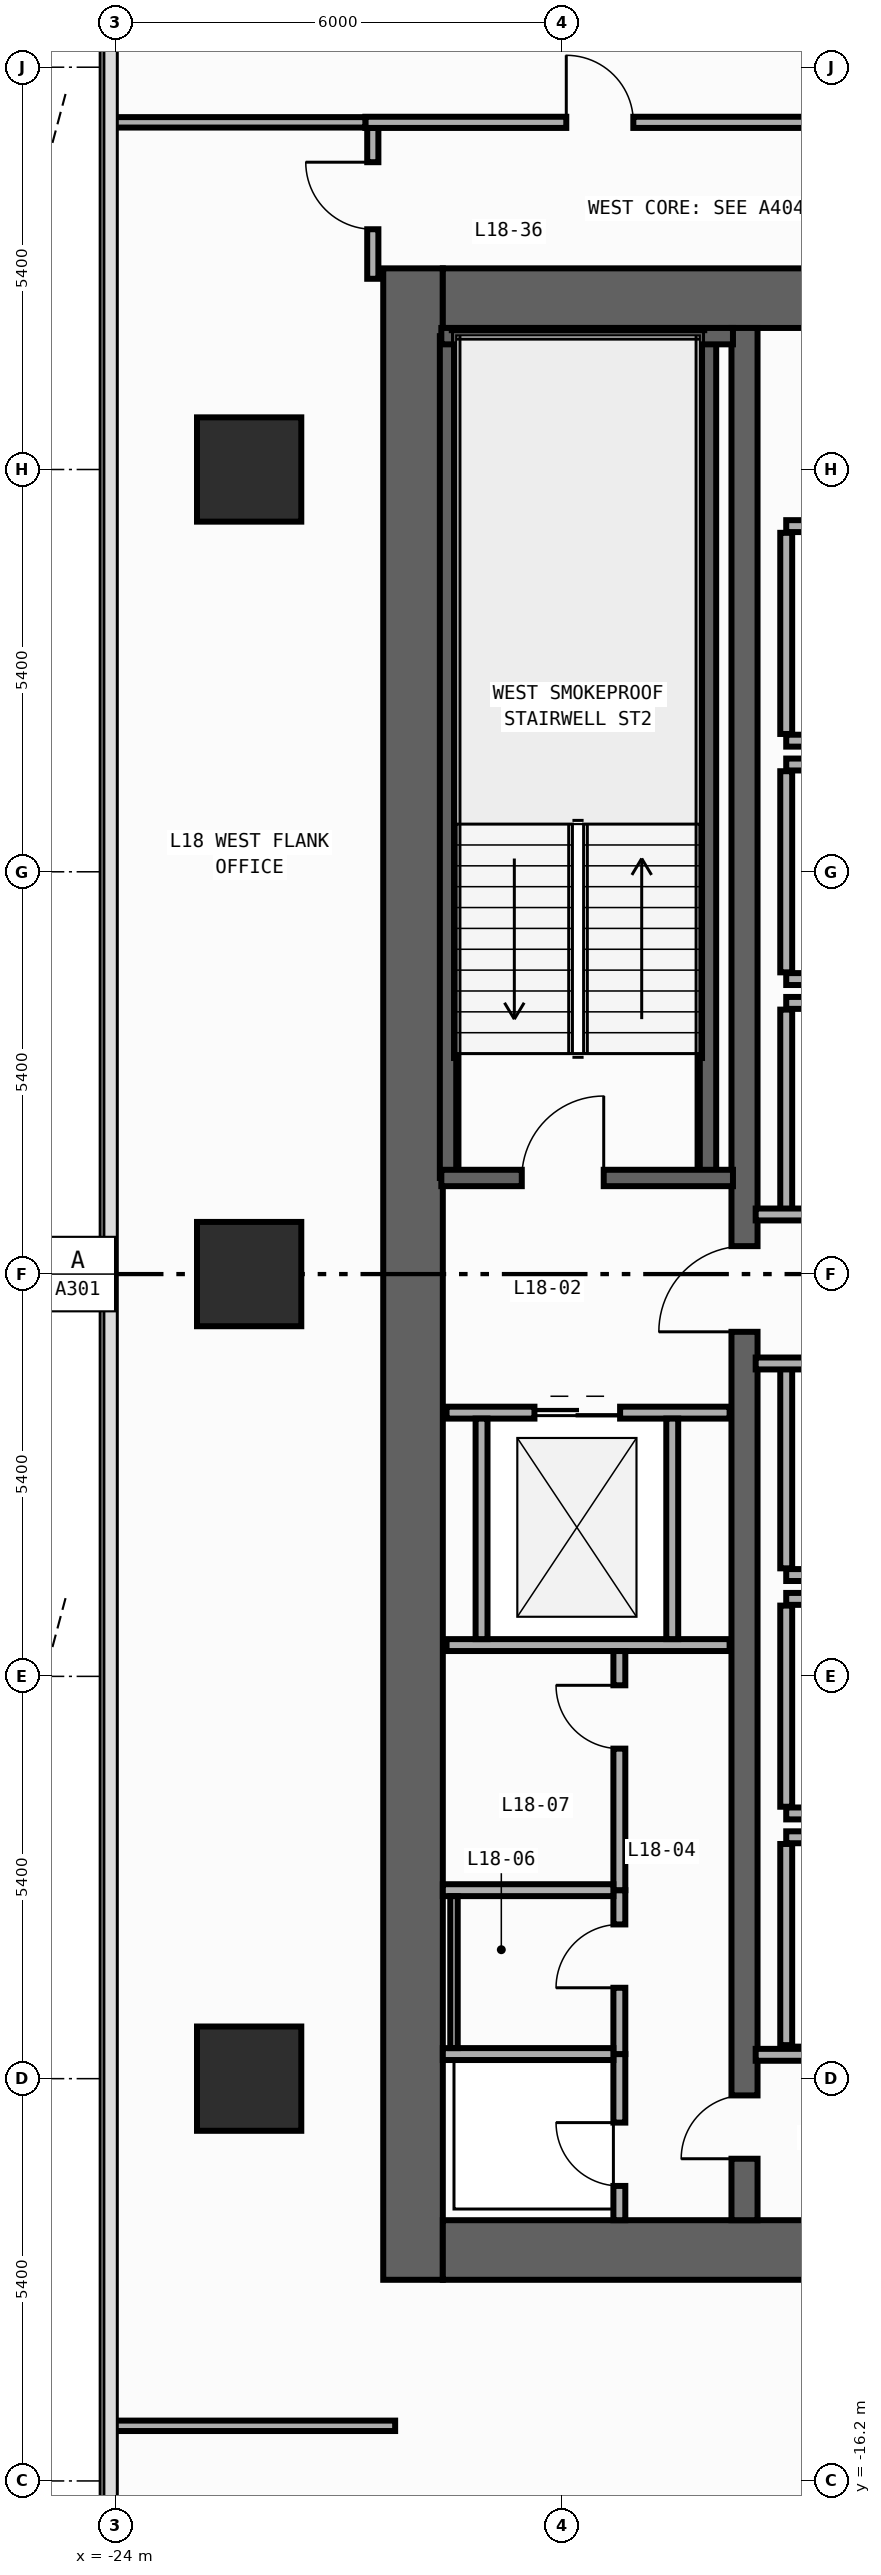
"""IFC4 building model, lengths in metres.
Left out: names, types, materials, properties, quantities, classifications, styles, units other than length and angle.
Written with IfcOpenShell. Run it as: python <this file> out.ifc"""

import sys

from ifc_helpers import new_model, si_unit, direction, frame, frame_2d, origin, origin_2d, place, context, subcontext, project, spatial, rectangle, extrude, element, fill, save


model = new_model("IFC4")
c1 = context("Model", 3, precision=1e-05, world=origin(), true_north=direction((0.0, 1.0)))
c2 = subcontext(c1, "Body", "Model", "MODEL_VIEW")
j1 = project(units=[si_unit("LENGTHUNIT", "METRE"), si_unit("PLANEANGLEUNIT", "RADIAN")], contexts=[c1])
p1 = place(None, origin())
s1 = spatial("IfcSite", under=j1, at=p1, CompositionType="ELEMENT")
p2 = place(p1, origin())
s2 = spatial("IfcBuilding", under=s1, at=p2, CompositionType="ELEMENT")
p3 = place(p2, frame((0.0, 0.0, 76.4)))
s3 = spatial("IfcBuildingStorey", under=s2, at=p3, CompositionType="ELEMENT", Elevation=76.4)
p4 = place(p3, frame((-20.0, -13.5, 0.0), z_axis=(0.0, 0.0, 1.0), x_axis=(0.0, 1.0, 0.0)))
e1 = element("IfcWall", 1, at=p4, inside=s3, PredefinedType="SHEAR", context=c2, shape_type="SweptSolid", body=[
    extrude(rectangle(XDim=27.0, YDim=0.8, at=frame_2d((13.5, 0.0))), origin(), (0.0, 0.0, 1.0), 3.94),
])
for number, where, z_axis, x_axis in (
    (2, (-19.6, -13.1, 0.0), (0.0, 0.0, 1.0), (1.0, 0.0, 0.0)),
    (3, (-19.6, 13.1, 0.0), (0.0, 0.0, 1.0), (1.0, 0.0, 0.0)),
):
    element("IfcWall", number, at=place(p3, frame(where, z_axis=z_axis, x_axis=x_axis)), inside=s3, PredefinedType="SHEAR", context=c2, shape_type="SweptSolid", body=[
        extrude(rectangle(XDim=6.8, YDim=0.8, at=frame_2d((3.4, 0.0))), origin(), (0.0, 0.0, 1.0), 3.94),
    ])
p5 = place(p3, frame((-15.55, -12.7, 0.0), z_axis=(0.0, 0.0, 1.0), x_axis=(0.0, 1.0, 0.0)))
e4 = element("IfcWall", 4, at=p5, inside=s3, PredefinedType="SHEAR", context=c2, shape_type="SweptSolid", body=[
    extrude(rectangle(XDim=25.4, YDim=0.35, at=frame_2d((12.7, 0.0))), origin(), (0.0, 0.0, 1.0), 3.94),
])
p6 = place(p5, frame((11.925, 0.0, 0.0)))
e5 = element("IfcOpeningElement", 5, at=p6, cuts=e4, PredefinedType="OPENING", context=c2, shape_type="SweptSolid", body=[
    extrude(rectangle(XDim=1.15, YDim=2.2, at=frame_2d((0.575, 1.1))), frame((0.0, 0.185, 0.0), z_axis=(0.0, -1.0, 0.0), x_axis=(1.0, 0.0, 0.0)), (0.0, 0.0, 1.0), 0.37),
])
p7 = place(p5, frame((0.825, 0.0, 0.0)))
e6 = element("IfcOpeningElement", 6, at=p7, cuts=e4, PredefinedType="OPENING", context=c2, shape_type="SweptSolid", body=[
    extrude(rectangle(XDim=0.85, YDim=2.1, at=frame_2d((0.425, 1.05))), frame((0.0, 0.185, 0.0), z_axis=(0.0, -1.0, 0.0), x_axis=(1.0, 0.0, 0.0)), (0.0, 0.0, 1.0), 0.37),
])
for number, where, z_axis, x_axis in (
    (7, (-16.04, 1.29, 0.0), (0.0, 0.0, 1.0), (0.0, 1.0, 0.0)),
    (8, (-19.53, 1.29, 0.0), (0.0, 0.0, 1.0), (0.0, 1.0, 0.0)),
):
    element("IfcWall", number, at=place(p3, frame(where, z_axis=z_axis, x_axis=x_axis)), inside=s3, PredefinedType="SHEAR", context=c2, shape_type="SweptSolid", body=[
        extrude(rectangle(XDim=11.3, YDim=0.22, at=frame_2d((5.65, 0.0))), origin(), (0.0, 0.0, 1.0), 3.94),
    ])
p8 = place(p3, frame((-19.62, 12.59, 0.0), z_axis=(0.0, 0.0, 1.0), x_axis=(1.0, 0.0, 0.0)))
e9 = element("IfcWall", 9, at=p8, inside=s3, PredefinedType="SHEAR", context=c2, shape_type="SweptSolid", body=[
    extrude(rectangle(XDim=3.915, YDim=0.22, at=frame_2d((1.958, 0.0))), origin(), (0.0, 0.0, 1.0), 3.94),
])
p9 = place(p3, frame((-19.62, 1.29, 0.0), z_axis=(0.0, 0.0, 1.0), x_axis=(1.0, 0.0, 0.0)))
e10 = element("IfcWall", 10, at=p9, inside=s3, PredefinedType="SHEAR", context=c2, shape_type="SweptSolid", body=[
    extrude(rectangle(XDim=3.915, YDim=0.22, at=frame_2d((1.958, 0.0))), origin(), (0.0, 0.0, 1.0), 3.94),
])
p10 = place(p9, frame((1.08, 0.0, 0.0)))
e11 = element("IfcOpeningElement", 11, at=p10, cuts=e10, PredefinedType="OPENING", context=c2, shape_type="SweptSolid", body=[
    extrude(rectangle(XDim=1.1, YDim=2.2, at=frame_2d((0.55, 1.1))), frame((0.0, 0.12, 0.0), z_axis=(0.0, -1.0, 0.0), x_axis=(1.0, 0.0, 0.0)), (0.0, 0.0, 1.0), 0.24),
])
for number, where, z_axis, x_axis in (
    (12, (-22.2, -10.8, 0.0), (0.0, 0.0, 1.0), (1.0, 0.0, 0.0)),
    (13, (-22.2, 0.0, 0.0), (0.0, 0.0, 1.0), (1.0, 0.0, 0.0)),
    (14, (-22.2, 10.8, 0.0), (0.0, 0.0, 1.0), (1.0, 0.0, 0.0)),
):
    element("IfcColumn", number, at=place(p3, frame(where, z_axis=z_axis, x_axis=x_axis)), inside=s3, PredefinedType="COLUMN", context=c2, shape_type="SweptSolid", body=[
        extrude(rectangle(XDim=1.4, YDim=1.4, at=origin_2d()), origin(), (0.0, 0.0, 1.0), 4.2),
    ])
for number, where, z_axis, x_axis in (
    (15, (-14.99, 7.16, 0.0), (0.0, 0.0, 1.0), (1.0, 0.0, 0.0)),
    (16, (-14.99, 10.04, 0.0), (0.0, 0.0, 1.0), (1.0, 0.0, 0.0)),
):
    element("IfcWall", number, at=place(p3, frame(where, z_axis=z_axis, x_axis=x_axis)), inside=s3, PredefinedType="STANDARD", context=c2, shape_type="SweptSolid", body=[
        extrude(rectangle(XDim=2.19, YDim=0.16, at=frame_2d((1.095, 0.0))), origin(), (0.0, 0.0, 1.0), 3.94),
    ])
p11 = place(p3, frame((-14.99, 7.25, 0.0), z_axis=(0.0, 0.0, 1.0), x_axis=(0.0, 1.0, 0.0)))
e17 = element("IfcWall", 17, at=p11, inside=s3, PredefinedType="STANDARD", context=c2, shape_type="SweptSolid", body=[
    extrude(rectangle(XDim=2.7, YDim=0.16, at=frame_2d((1.35, 0.0))), origin(), (0.0, 0.0, 1.0), 3.94),
])
for number, where, z_axis, x_axis in (
    (18, (-14.99, 3.96, 0.0), (0.0, 0.0, 1.0), (1.0, 0.0, 0.0)),
    (19, (-14.99, 6.84, 0.0), (0.0, 0.0, 1.0), (1.0, 0.0, 0.0)),
):
    element("IfcWall", number, at=place(p3, frame(where, z_axis=z_axis, x_axis=x_axis)), inside=s3, PredefinedType="STANDARD", context=c2, shape_type="SweptSolid", body=[
        extrude(rectangle(XDim=2.19, YDim=0.16, at=frame_2d((1.095, 0.0))), origin(), (0.0, 0.0, 1.0), 3.94),
    ])
p12 = place(p3, frame((-14.99, 4.05, 0.0), z_axis=(0.0, 0.0, 1.0), x_axis=(0.0, 1.0, 0.0)))
e20 = element("IfcWall", 20, at=p12, inside=s3, PredefinedType="STANDARD", context=c2, shape_type="SweptSolid", body=[
    extrude(rectangle(XDim=2.7, YDim=0.16, at=frame_2d((1.35, 0.0))), origin(), (0.0, 0.0, 1.0), 3.94),
])
p13 = place(p3, frame((-14.99, 3.64, 0.0), z_axis=(0.0, 0.0, 1.0), x_axis=(1.0, 0.0, 0.0)))
e21 = element("IfcWall", 21, at=p13, inside=s3, PredefinedType="STANDARD", context=c2, shape_type="SweptSolid", body=[
    extrude(rectangle(XDim=2.19, YDim=0.16, at=frame_2d((1.095, 0.0))), origin(), (0.0, 0.0, 1.0), 3.94),
])
p14 = place(p3, frame((-14.99, 0.85, 0.0), z_axis=(0.0, 0.0, 1.0), x_axis=(0.0, 1.0, 0.0)))
e22 = element("IfcWall", 22, at=p14, inside=s3, PredefinedType="STANDARD", context=c2, shape_type="SweptSolid", body=[
    extrude(rectangle(XDim=2.7, YDim=0.16, at=frame_2d((1.35, 0.0))), origin(), (0.0, 0.0, 1.0), 3.94),
])
p15 = place(p3, frame((-14.99, -4.04, 0.0), z_axis=(0.0, 0.0, 1.0), x_axis=(1.0, 0.0, 0.0)))
e23 = element("IfcWall", 23, at=p15, inside=s3, PredefinedType="STANDARD", context=c2, shape_type="SweptSolid", body=[
    extrude(rectangle(XDim=2.19, YDim=0.16, at=frame_2d((1.095, 0.0))), origin(), (0.0, 0.0, 1.0), 3.94),
])
p16 = place(p3, frame((-14.99, -3.95, 0.0), z_axis=(0.0, 0.0, 1.0), x_axis=(0.0, 1.0, 0.0)))
e24 = element("IfcWall", 24, at=p16, inside=s3, PredefinedType="STANDARD", context=c2, shape_type="SweptSolid", body=[
    extrude(rectangle(XDim=2.7, YDim=0.16, at=frame_2d((1.35, 0.0))), origin(), (0.0, 0.0, 1.0), 3.94),
])
for number, where, z_axis, x_axis in (
    (25, (-14.99, -7.24, 0.0), (0.0, 0.0, 1.0), (1.0, 0.0, 0.0)),
    (26, (-14.99, -4.36, 0.0), (0.0, 0.0, 1.0), (1.0, 0.0, 0.0)),
):
    element("IfcWall", number, at=place(p3, frame(where, z_axis=z_axis, x_axis=x_axis)), inside=s3, PredefinedType="STANDARD", context=c2, shape_type="SweptSolid", body=[
        extrude(rectangle(XDim=2.19, YDim=0.16, at=frame_2d((1.095, 0.0))), origin(), (0.0, 0.0, 1.0), 3.94),
    ])
p17 = place(p3, frame((-14.99, -7.15, 0.0), z_axis=(0.0, 0.0, 1.0), x_axis=(0.0, 1.0, 0.0)))
e27 = element("IfcWall", 27, at=p17, inside=s3, PredefinedType="STANDARD", context=c2, shape_type="SweptSolid", body=[
    extrude(rectangle(XDim=2.7, YDim=0.16, at=frame_2d((1.35, 0.0))), origin(), (0.0, 0.0, 1.0), 3.94),
])
p18 = place(p3, frame((-14.99, -7.56, 0.0), z_axis=(0.0, 0.0, 1.0), x_axis=(1.0, 0.0, 0.0)))
e28 = element("IfcWall", 28, at=p18, inside=s3, PredefinedType="STANDARD", context=c2, shape_type="SweptSolid", body=[
    extrude(rectangle(XDim=2.19, YDim=0.16, at=frame_2d((1.095, 0.0))), origin(), (0.0, 0.0, 1.0), 3.94),
])
p19 = place(p3, frame((-14.99, -10.35, 0.0), z_axis=(0.0, 0.0, 1.0), x_axis=(0.0, 1.0, 0.0)))
e29 = element("IfcWall", 29, at=p19, inside=s3, PredefinedType="STANDARD", context=c2, shape_type="SweptSolid", body=[
    extrude(rectangle(XDim=2.7, YDim=0.16, at=frame_2d((1.35, 0.0))), origin(), (0.0, 0.0, 1.0), 3.94),
])
p20 = place(p3, frame((-19.55, -1.86, 0.0), z_axis=(0.0, 0.0, 1.0), x_axis=(1.0, 0.0, 0.0)))
e30 = element("IfcWall", 30, at=p20, inside=s3, PredefinedType="STANDARD", context=c2, shape_type="SweptSolid", body=[
    extrude(rectangle(XDim=3.8, YDim=0.16, at=frame_2d((1.9, 0.0))), origin(), (0.0, 0.0, 1.0), 3.94),
])
p21 = place(p20, frame((1.18, 0.0, 0.0)))
e31 = element("IfcOpeningElement", 31, at=p21, cuts=e30, PredefinedType="OPENING", context=c2, shape_type="SweptSolid", body=[
    extrude(rectangle(XDim=1.15, YDim=2.2, at=frame_2d((0.575, 1.1))), frame((0.0, 0.09, 0.0), z_axis=(0.0, -1.0, 0.0), x_axis=(1.0, 0.0, 0.0)), (0.0, 0.0, 1.0), 0.18),
])
p22 = place(p3, frame((-19.55, -4.98, 0.0), z_axis=(0.0, 0.0, 1.0), x_axis=(1.0, 0.0, 0.0)))
e32 = element("IfcWall", 32, at=p22, inside=s3, PredefinedType="STANDARD", context=c2, shape_type="SweptSolid", body=[
    extrude(rectangle(XDim=3.8, YDim=0.16, at=frame_2d((1.9, 0.0))), origin(), (0.0, 0.0, 1.0), 3.94),
])
for number, where, z_axis, x_axis in (
    (33, (-19.08, -4.9, 0.0), (0.0, 0.0, 1.0), (0.0, 1.0, 0.0)),
    (34, (-16.52, -4.9, 0.0), (0.0, 0.0, 1.0), (0.0, 1.0, 0.0)),
):
    element("IfcWall", number, at=place(p3, frame(where, z_axis=z_axis, x_axis=x_axis)), inside=s3, PredefinedType="STANDARD", context=c2, shape_type="SweptSolid", body=[
        extrude(rectangle(XDim=2.96, YDim=0.16, at=frame_2d((1.48, 0.0))), origin(), (0.0, 0.0, 1.0), 3.94),
    ])
for number, where, z_axis, x_axis in (
    (35, (-15.4, 0.8, 0.0), (0.0, 0.0, 1.0), (1.0, 0.0, 0.0)),
    (36, (-15.4, -1.2, 0.0), (0.0, 0.0, 1.0), (1.0, 0.0, 0.0)),
    (37, (-15.4, -10.48, 0.0), (0.0, 0.0, 1.0), (1.0, 0.0, 0.0)),
):
    element("IfcWall", number, at=place(p3, frame(where, z_axis=z_axis, x_axis=x_axis)), inside=s3, PredefinedType="STANDARD", context=c2, shape_type="SweptSolid", body=[
        extrude(rectangle(XDim=2.6, YDim=0.16, at=frame_2d((1.3, 0.0))), origin(), (0.0, 0.0, 1.0), 3.94),
    ])
p23 = place(p3, frame((-17.23, -12.7, 0.0), z_axis=(0.0, 0.0, 1.0), x_axis=(0.0, 1.0, 0.0)))
e38 = element("IfcWall", 38, at=p23, inside=s3, PredefinedType="PARTITIONING", context=c2, shape_type="SweptSolid", body=[
    extrude(rectangle(XDim=2.23, YDim=0.16, at=frame_2d((1.115, 0.0))), origin(), (0.0, 0.0, 1.0), 3.94),
])
p24 = place(p23, frame((0.46, 0.0, 0.0)))
e39 = element("IfcOpeningElement", 39, at=p24, cuts=e38, PredefinedType="OPENING", context=c2, shape_type="SweptSolid", body=[
    extrude(rectangle(XDim=0.85, YDim=2.1, at=frame_2d((0.425, 1.05))), frame((0.0, 0.09, 0.0), z_axis=(0.0, -1.0, 0.0), x_axis=(1.0, 0.0, 0.0)), (0.0, 0.0, 1.0), 0.18),
])
p25 = place(p3, frame((-17.23, -10.47, 0.0), z_axis=(0.0, 0.0, 1.0), x_axis=(0.0, 1.0, 0.0)))
e40 = element("IfcWall", 40, at=p25, inside=s3, PredefinedType="PARTITIONING", context=c2, shape_type="SweptSolid", body=[
    extrude(rectangle(XDim=2.2, YDim=0.16, at=frame_2d((1.1, 0.0))), origin(), (0.0, 0.0, 1.0), 3.94),
])
p26 = place(p25, frame((0.89, 0.0, 0.0)))
e41 = element("IfcOpeningElement", 41, at=p26, cuts=e40, PredefinedType="OPENING", context=c2, shape_type="SweptSolid", body=[
    extrude(rectangle(XDim=0.85, YDim=2.1, at=frame_2d((0.425, 1.05))), frame((0.0, 0.09, 0.0), z_axis=(0.0, -1.0, 0.0), x_axis=(1.0, 0.0, 0.0)), (0.0, 0.0, 1.0), 0.18),
])
p27 = place(p3, frame((-17.23, -8.27, 0.0), z_axis=(0.0, 0.0, 1.0), x_axis=(0.0, 1.0, 0.0)))
e42 = element("IfcWall", 42, at=p27, inside=s3, PredefinedType="PARTITIONING", context=c2, shape_type="SweptSolid", body=[
    extrude(rectangle(XDim=3.21, YDim=0.16, at=frame_2d((1.605, 0.0))), origin(), (0.0, 0.0, 1.0), 3.94),
])
p28 = place(p27, frame((1.9, 0.0, 0.0)))
e43 = element("IfcOpeningElement", 43, at=p28, cuts=e42, PredefinedType="OPENING", context=c2, shape_type="SweptSolid", body=[
    extrude(rectangle(XDim=0.85, YDim=2.1, at=frame_2d((0.425, 1.05))), frame((0.0, 0.09, 0.0), z_axis=(0.0, -1.0, 0.0), x_axis=(1.0, 0.0, 0.0)), (0.0, 0.0, 1.0), 0.18),
])
for number, where, z_axis, x_axis in (
    (44, (-19.6, -10.47, 0.0), (0.0, 0.0, 1.0), (1.0, 0.0, 0.0)),
    (45, (-19.6, -8.27, 0.0), (0.0, 0.0, 1.0), (1.0, 0.0, 0.0)),
):
    element("IfcWall", number, at=place(p3, frame(where, z_axis=z_axis, x_axis=x_axis)), inside=s3, PredefinedType="PARTITIONING", context=c2, shape_type="SweptSolid", body=[
        extrude(rectangle(XDim=2.29, YDim=0.16, at=frame_2d((1.145, 0.0))), origin(), (0.0, 0.0, 1.0), 3.94),
    ])
p29 = place(p3, frame((-20.54, 13.36, 0.0), z_axis=(0.0, 0.0, 1.0), x_axis=(0.0, 1.0, 0.0)))
e46 = element("IfcWall", 46, at=p29, inside=s3, PredefinedType="PARTITIONING", context=c2, shape_type="SweptSolid", body=[
    extrude(rectangle(XDim=2.025, YDim=0.15, at=frame_2d((1.012, 0.0))), origin(), (0.0, 0.0, 1.0), 3.94),
])
p30 = place(p29, frame((0.665, 0.0, 0.0)))
e47 = element("IfcOpeningElement", 47, at=p30, cuts=e46, PredefinedType="OPENING", context=c2, shape_type="SweptSolid", body=[
    extrude(rectangle(XDim=0.9, YDim=2.15, at=frame_2d((0.45, 1.075))), frame((0.0, 0.085, 0.0), z_axis=(0.0, -1.0, 0.0), x_axis=(1.0, 0.0, 0.0)), (0.0, 0.0, 1.0), 0.17),
])
p31 = place(p3, frame((-20.64, 15.46, 0.0), z_axis=(0.0, 0.0, 1.0), x_axis=(1.0, 0.0, 0.0)))
e48 = element("IfcWall", 48, at=p31, inside=s3, PredefinedType="PARTITIONING", context=c2, shape_type="SweptSolid", body=[
    extrude(rectangle(XDim=7.312, YDim=0.15, at=frame_2d((3.656, 0.0))), origin(), (0.0, 0.0, 1.0), 3.94),
])
p32 = place(p31, frame((2.698, 0.0, 0.0)))
e49 = element("IfcOpeningElement", 49, at=p32, cuts=e48, PredefinedType="OPENING", context=c2, shape_type="SweptSolid", body=[
    extrude(rectangle(XDim=0.9, YDim=2.15, at=frame_2d((0.45, 1.075))), frame((0.0, 0.085, 0.0), z_axis=(0.0, -1.0, 0.0), x_axis=(1.0, 0.0, 0.0)), (0.0, 0.0, 1.0), 0.17),
])
p33 = place(p3, frame((-24.055, 15.46, 0.0), z_axis=(0.0, 0.0, 1.0), x_axis=(1.0, 0.0, 0.0)))
e50 = element("IfcWall", 50, at=p33, inside=s3, PredefinedType="PARTITIONING", context=c2, shape_type="SweptSolid", body=[
    extrude(rectangle(XDim=3.415, YDim=0.14, at=frame_2d((1.708, 0.0))), origin(), (0.0, 0.0, 1.0), 3.94),
])
p34 = place(p3, frame((-24.055, -15.46, 0.0), z_axis=(0.0, 0.0, 1.0), x_axis=(1.0, 0.0, 0.0)))
e51 = element("IfcWall", 51, at=p34, inside=s3, PredefinedType="PARTITIONING", context=c2, shape_type="SweptSolid", body=[
    extrude(rectangle(XDim=3.815, YDim=0.14, at=frame_2d((1.907, 0.0))), origin(), (0.0, 0.0, 1.0), 3.94),
])
p35 = place(p3, frame((-19.45, -10.39, 0.0), z_axis=(0.0, 0.0, 1.0), x_axis=(0.0, 1.0, 0.0)))
e52 = element("IfcWall", 52, at=p35, inside=s3, PredefinedType="PARTITIONING", context=c2, shape_type="SweptSolid", body=[
    extrude(rectangle(XDim=2.04, YDim=0.1, at=frame_2d((1.02, 0.0))), origin(), (0.0, 0.0, 1.0), 3.94),
])
p36 = place(p10, origin())
e53 = element("IfcDoor", 53, at=p36, inside=s3, OperationType="SINGLE_SWING_RIGHT", PredefinedType="DOOR", context=c2, shape_type="SweptSolid", body=[
    extrude(rectangle(XDim=1.1, YDim=2.2, at=frame_2d((0.55, 1.1))), frame((0.0, 0.025, 0.0), z_axis=(0.0, -1.0, 0.0), x_axis=(1.0, 0.0, 0.0)), (0.0, 0.0, 1.0), 0.05),
])
fill(e11, e53)
p37 = place(p6, origin())
e54 = element("IfcDoor", 54, at=p37, inside=s3, OperationType="SINGLE_SWING_LEFT", PredefinedType="DOOR", context=c2, shape_type="SweptSolid", body=[
    extrude(rectangle(XDim=1.15, YDim=2.2, at=frame_2d((0.575, 1.1))), frame((0.0, 0.025, 0.0), z_axis=(0.0, -1.0, 0.0), x_axis=(1.0, 0.0, 0.0)), (0.0, 0.0, 1.0), 0.05),
])
fill(e5, e54)
p38 = place(p7, origin())
e55 = element("IfcDoor", 55, at=p38, inside=s3, OperationType="SINGLE_SWING_LEFT", PredefinedType="DOOR", context=c2, shape_type="SweptSolid", body=[
    extrude(rectangle(XDim=0.85, YDim=2.1, at=frame_2d((0.425, 1.05))), frame((0.0, 0.025, 0.0), z_axis=(0.0, -1.0, 0.0), x_axis=(1.0, 0.0, 0.0)), (0.0, 0.0, 1.0), 0.05),
])
fill(e6, e55)
p39 = place(p21, origin())
e56 = element("IfcDoor", 56, at=p39, inside=s3, OperationType="DOUBLE_DOOR_SLIDING", PredefinedType="DOOR", context=c2, shape_type="SweptSolid", body=[
    extrude(rectangle(XDim=1.15, YDim=2.2, at=frame_2d((0.575, 1.1))), frame((0.0, 0.025, 0.0), z_axis=(0.0, -1.0, 0.0), x_axis=(1.0, 0.0, 0.0)), (0.0, 0.0, 1.0), 0.05),
])
fill(e31, e56)
p40 = place(p24, origin())
e57 = element("IfcDoor", 57, at=p40, inside=s3, OperationType="SINGLE_SWING_RIGHT", PredefinedType="DOOR", context=c2, shape_type="SweptSolid", body=[
    extrude(rectangle(XDim=0.85, YDim=2.1, at=frame_2d((0.425, 1.05))), frame((0.0, 0.025, 0.0), z_axis=(0.0, -1.0, 0.0), x_axis=(1.0, 0.0, 0.0)), (0.0, 0.0, 1.0), 0.05),
])
fill(e39, e57)
p41 = place(p26, origin())
e58 = element("IfcDoor", 58, at=p41, inside=s3, OperationType="SINGLE_SWING_LEFT", PredefinedType="DOOR", context=c2, shape_type="SweptSolid", body=[
    extrude(rectangle(XDim=0.85, YDim=2.1, at=frame_2d((0.425, 1.05))), frame((0.0, 0.025, 0.0), z_axis=(0.0, -1.0, 0.0), x_axis=(1.0, 0.0, 0.0)), (0.0, 0.0, 1.0), 0.05),
])
fill(e41, e58)
p42 = place(p28, origin())
e59 = element("IfcDoor", 59, at=p42, inside=s3, OperationType="SINGLE_SWING_RIGHT", PredefinedType="DOOR", context=c2, shape_type="SweptSolid", body=[
    extrude(rectangle(XDim=0.85, YDim=2.1, at=frame_2d((0.425, 1.05))), frame((0.0, 0.025, 0.0), z_axis=(0.0, -1.0, 0.0), x_axis=(1.0, 0.0, 0.0)), (0.0, 0.0, 1.0), 0.05),
])
fill(e43, e59)
p43 = place(p30, origin())
e60 = element("IfcDoor", 60, at=p43, inside=s3, OperationType="SINGLE_SWING_RIGHT", PredefinedType="DOOR", context=c2, shape_type="SweptSolid", body=[
    extrude(rectangle(XDim=0.9, YDim=2.15, at=frame_2d((0.45, 1.075))), frame((0.0, 0.025, 0.0), z_axis=(0.0, -1.0, 0.0), x_axis=(1.0, 0.0, 0.0)), (0.0, 0.0, 1.0), 0.05),
])
fill(e47, e60)
p44 = place(p32, origin())
e61 = element("IfcDoor", 61, at=p44, inside=s3, OperationType="SINGLE_SWING_LEFT", PredefinedType="DOOR", context=c2, shape_type="SweptSolid", body=[
    extrude(rectangle(XDim=0.9, YDim=2.15, at=frame_2d((0.45, 1.075))), frame((0.0, 0.025, 0.0), z_axis=(0.0, -1.0, 0.0), x_axis=(1.0, 0.0, 0.0)), (0.0, 0.0, 1.0), 0.05),
])
fill(e49, e61)
save(model, sys.argv[1])
